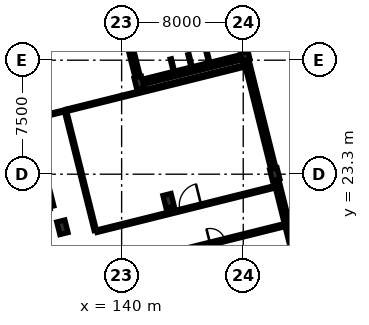
"""IFC4 building model, lengths in metres.
Left out: names, types, materials, properties, quantities, classifications, styles, units other than length and angle.
Written with IfcOpenShell. Run it as: python <this file> out.ifc"""

import sys

from ifc_helpers import new_model, si_unit, direction, frame, frame_2d, origin, origin_2d, place, context, subcontext, project, spatial, rectangle, extrude, element, fill, save


model = new_model("IFC4")
c1 = context("Model", 3, precision=1e-05, world=origin(), true_north=direction((0.0, 1.0)))
c2 = subcontext(c1, "Body", "Model", "MODEL_VIEW")
j1 = project(units=[si_unit("LENGTHUNIT", "METRE"), si_unit("PLANEANGLEUNIT", "RADIAN")], contexts=[c1])
p1 = place(None, origin())
s1 = spatial("IfcSite", under=j1, at=p1, CompositionType="ELEMENT")
p2 = place(p1, origin())
s2 = spatial("IfcBuilding", under=s1, at=p2, CompositionType="ELEMENT")
p3 = place(p2, frame((0.0, 0.0, 13.5)))
s3 = spatial("IfcBuildingStorey", under=s2, at=p3, CompositionType="ELEMENT", Elevation=13.5)
for number, where, z_axis, x_axis in (
    (1, (136.102, 19.808, 0.0), (0.0, 0.0, 1.0), (0.97, 0.242, 0.0)),
    (2, (143.088, 21.55, 0.0), (0.0, 0.0, 1.0), (0.97, 0.242, 0.0)),
):
    element("IfcColumn", number, at=place(p3, frame(where, z_axis=z_axis, x_axis=x_axis)), inside=s3, PredefinedType="COLUMN", context=c2, shape_type="SweptSolid", body=[
        extrude(rectangle(XDim=0.55, YDim=0.85, at=origin_2d()), origin(), (0.0, 0.0, 1.0), 3.72),
    ])
p4 = place(p3, frame((141.152, 29.312, 0.0), z_axis=(0.0, 0.0, 1.0), x_axis=(0.970295726276, 0.2419218956, 0.0)))
e3 = element("IfcColumn", 3, at=p4, inside=s3, PredefinedType="COLUMN", context=c2, shape_type="SweptSolid", body=[
    extrude(rectangle(XDim=0.5, YDim=0.75, at=origin_2d()), origin(), (0.0, 0.0, 1.0), 3.72),
])
p5 = place(p3, frame((150.074, 23.292, 0.0), z_axis=(0.0, 0.0, 1.0), x_axis=(0.970295726276, 0.2419218956, 0.0)))
e4 = element("IfcColumn", 4, at=p5, inside=s3, PredefinedType="COLUMN", context=c2, shape_type="SweptSolid", body=[
    extrude(rectangle(XDim=0.5, YDim=0.75, at=origin_2d()), origin(), (0.0, 0.0, 1.0), 3.75),
])
p6 = place(p3, frame((148.138, 31.054, 0.0), z_axis=(0.0, 0.0, 1.0), x_axis=(0.970295726276, 0.2419218956, 0.0)))
e5 = element("IfcColumn", 5, at=p6, inside=s3, PredefinedType="COLUMN", context=c2, shape_type="SweptSolid", body=[
    extrude(rectangle(XDim=0.5, YDim=0.5, at=origin_2d()), origin(), (0.0, 0.0, 1.0), 3.72),
])
p7 = place(p3, frame((139.277, 36.833, 0.0), z_axis=(0.0, 0.0, 1.0), x_axis=(0.241920240952, -0.970296138825, 0.0)))
e6 = element("IfcWall", 6, at=p7, inside=s3, PredefinedType="SOLIDWALL", context=c2, shape_type="SweptSolid", body=[
    extrude(rectangle(XDim=7.375, YDim=0.35, at=frame_2d((3.688, 0.0))), origin(), (0.0, 0.0, 1.0), 3.055),
])
p8 = place(p3, frame((141.395, 29.373, 0.0), z_axis=(0.0, 0.0, 1.0), x_axis=(0.970296633454, 0.241918257079, 0.0)))
e7 = element("IfcWall", 7, at=p8, inside=s3, PredefinedType="SOLIDWALL", context=c2, shape_type="SweptSolid", body=[
    extrude(rectangle(XDim=6.7, YDim=0.35, at=frame_2d((3.35, 0.0))), origin(), (0.0, 0.0, 1.0), 3.005),
])
p9 = place(p3, frame((148.199, 30.812, 0.0), z_axis=(0.0, 0.0, 1.0), x_axis=(0.241928011715, -0.970294201337, 0.0)))
e8 = element("IfcWall", 8, at=p9, inside=s3, PredefinedType="SOLIDWALL", context=c2, shape_type="SweptSolid", body=[
    extrude(rectangle(XDim=7.375, YDim=0.35, at=frame_2d((3.688, 0.0))), origin(), (0.0, 0.0, 1.0), 3.055),
])
p10 = place(p3, frame((150.165, 22.928, 0.0), z_axis=(0.0, 0.0, 1.0), x_axis=(0.241917549853, -0.970296809782, 0.0)))
e9 = element("IfcWall", 9, at=p10, inside=s3, PredefinedType="SOLIDWALL", context=c2, shape_type="SweptSolid", body=[
    extrude(rectangle(XDim=7.25, YDim=0.35, at=frame_2d((3.625, 0.0))), origin(), (0.0, 0.0, 1.0), 3.005),
])
p11 = place(p3, frame((135.402, 21.183, 0.0), z_axis=(0.0, 0.0, 1.0), x_axis=(-0.241921647353, 0.970295788171, 0.0)))
e10 = element("IfcWall", 10, at=p11, inside=s3, PredefinedType="SHEAR", context=c2, shape_type="SweptSolid", body=[
    extrude(rectangle(XDim=2.994, YDim=0.28, at=frame_2d((1.497, 0.0))), origin(), (0.0, 0.0, 1.0), 3.72),
])
p12 = place(p3, frame((141.899, 17.75, 0.0), z_axis=(0.0, 0.0, 1.0), x_axis=(0.970298775858, 0.241909664065, 0.0)))
e11 = element("IfcWall", 11, at=p12, inside=s3, PredefinedType="PARTITIONING", context=c2, shape_type="SweptSolid", body=[
    extrude(rectangle(XDim=9.086, YDim=0.2, at=frame_2d((4.543, 0.0))), origin(), (0.0, 0.0, 1.0), 2.905),
])
p13 = place(p12, frame((4.043, 0.0, 0.0)))
e12 = element("IfcOpeningElement", 12, at=p13, cuts=e11, PredefinedType="OPENING", context=c2, shape_type="SweptSolid", body=[
    extrude(rectangle(XDim=1.0, YDim=2.15, at=frame_2d((0.5, 1.075))), frame((0.0, 0.112, 0.0), z_axis=(0.0, -1.0, 0.0), x_axis=(1.0, 0.0, 0.0)), (0.0, 0.0, 1.0), 0.224),
])
p14 = place(p3, frame((138.367, 19.549, 0.0), z_axis=(0.0, 0.0, 1.0), x_axis=(0.970292133333, 0.241936305651, 0.0)))
e13 = element("IfcWall", 13, at=p14, inside=s3, PredefinedType="PARTITIONING", context=c2, shape_type="SweptSolid", body=[
    extrude(rectangle(XDim=12.078, YDim=0.16, at=frame_2d((6.039, 0.0))), origin(), (0.0, 0.0, 1.0), 2.905),
])
p15 = place(p14, frame((5.638, 0.0, 0.0)))
e14 = element("IfcOpeningElement", 14, at=p15, cuts=e13, PredefinedType="OPENING", context=c2, shape_type="SweptSolid", body=[
    extrude(rectangle(XDim=1.44, YDim=2.32, at=frame_2d((0.72, 1.16))), frame((0.0, 0.092, 0.0), z_axis=(0.0, -1.0, 0.0), x_axis=(1.0, 0.0, 0.0)), (0.0, 0.0, 1.0), 0.184),
])
p16 = place(p3, frame((136.383, 27.505, 0.0), z_axis=(0.0, 0.0, 1.0), x_axis=(0.970296878284, 0.241917275099, 0.0)))
e15 = element("IfcWall", 15, at=p16, inside=s3, PredefinedType="PARTITIONING", context=c2, shape_type="SweptSolid", body=[
    extrude(rectangle(XDim=12.078, YDim=0.15, at=frame_2d((6.039, 0.0))), origin(), (0.0, 0.0, 1.0), 3.005),
])
p17 = place(p3, frame((138.264, 19.611, 0.0), z_axis=(0.0, 0.0, 1.0), x_axis=(-0.241920353256, 0.970296110824, 0.0)))
e16 = element("IfcWall", 16, at=p17, inside=s3, PredefinedType="PARTITIONING", context=c2, shape_type="SweptSolid", body=[
    extrude(rectangle(XDim=8.03, YDim=0.15, at=frame_2d((4.015, 0.0))), origin(), (0.0, 0.0, 1.0), 3.005),
])
p18 = place(p3, frame((129.979, 25.908, 0.0), z_axis=(0.0, 0.0, 1.0), x_axis=(0.970297075448, 0.241916484304, 0.0)))
e17 = element("IfcWall", 17, at=p18, inside=s3, PredefinedType="PARTITIONING", context=c2, shape_type="SweptSolid", body=[
    extrude(rectangle(XDim=6.588, YDim=0.125, at=frame_2d((3.294, 0.0))), origin(), (0.0, 0.0, 1.0), 3.005),
])
p19 = place(p13, origin())
e18 = element("IfcDoor", 18, at=p19, inside=s3, OperationType="SINGLE_SWING_LEFT", PredefinedType="DOOR", context=c2, shape_type="SweptSolid", body=[
    extrude(rectangle(XDim=1.0, YDim=2.15, at=frame_2d((0.5, 1.075))), frame((0.0, 0.025, 0.0), z_axis=(0.0, -1.0, 0.0), x_axis=(1.0, 0.0, 0.0)), (0.0, 0.0, 1.0), 0.05),
])
fill(e12, e18)
p20 = place(p15, origin())
e19 = element("IfcDoor", 19, at=p20, inside=s3, OperationType="SINGLE_SWING_RIGHT", PredefinedType="DOOR", context=c2, shape_type="SweptSolid", body=[
    extrude(rectangle(XDim=1.44, YDim=2.32, at=frame_2d((0.72, 1.16))), frame((0.0, 0.025, 0.0), z_axis=(0.0, -1.0, 0.0), x_axis=(1.0, 0.0, 0.0)), (0.0, 0.0, 1.0), 0.05),
])
fill(e14, e19)
save(model, sys.argv[1])
